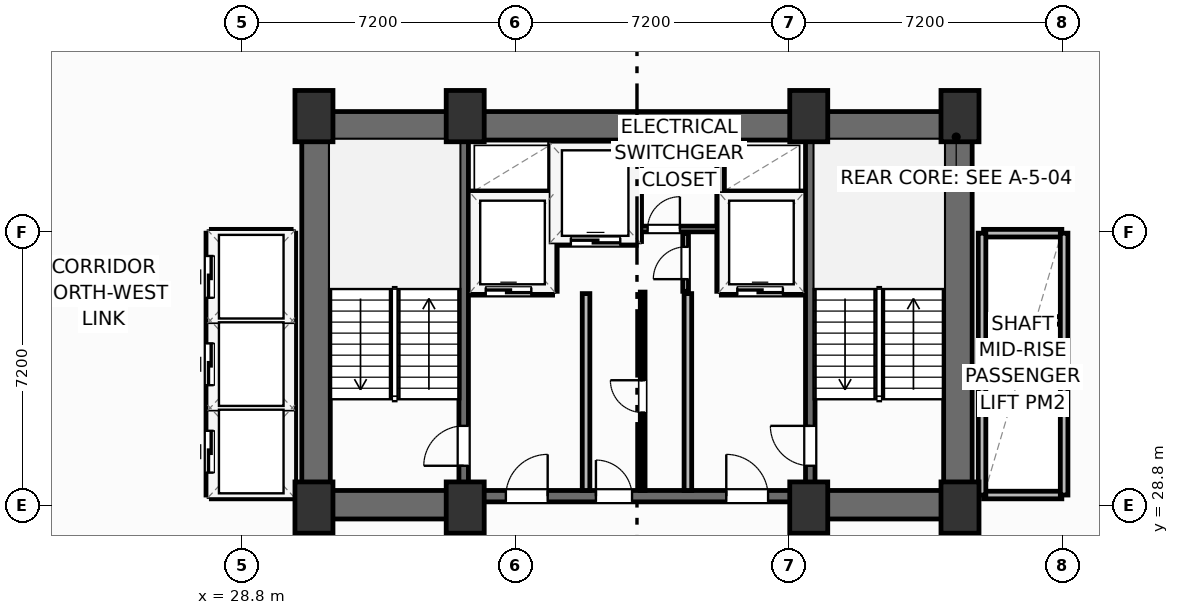
"""IFC4 building model, lengths in metres.
Left out: names, types, materials, properties, quantities, classifications, styles, units other than length and angle.
Written with IfcOpenShell. Run it as: python <this file> out.ifc"""

import sys

from ifc_helpers import new_model, si_unit, direction, frame, frame_2d, origin, origin_2d, place, context, subcontext, project, spatial, rectangle, extrude, element, fill, save


model = new_model("IFC4")
c1 = context("Model", 3, precision=1e-05, world=origin(), true_north=direction((0.0, 1.0)))
c2 = subcontext(c1, "Body", "Model", "MODEL_VIEW")
j1 = project(units=[si_unit("LENGTHUNIT", "METRE"), si_unit("PLANEANGLEUNIT", "RADIAN")], contexts=[c1])
p1 = place(None, origin())
s1 = spatial("IfcSite", under=j1, at=p1, CompositionType="ELEMENT")
p2 = place(p1, origin())
s2 = spatial("IfcBuilding", under=s1, at=p2, CompositionType="ELEMENT")
p3 = place(p2, frame((0.0, 0.0, 102.1)))
s3 = spatial("IfcBuildingStorey", under=s2, at=p3, CompositionType="ELEMENT", Elevation=102.1)
for number, where, z_axis, x_axis in (
    (1, (30.7, 28.75, 0.0), (0.0, 0.0, 1.0), (1.0, 0.0, 0.0)),
    (2, (34.68, 28.75, 0.0), (0.0, 0.0, 1.0), (1.0, 0.0, 0.0)),
    (3, (43.72, 28.75, 0.0), (0.0, 0.0, 1.0), (1.0, 0.0, 0.0)),
    (4, (47.7, 28.75, 0.0), (0.0, 0.0, 1.0), (1.0, 0.0, 0.0)),
    (5, (30.7, 39.05, 0.0), (0.0, 0.0, 1.0), (1.0, 0.0, 0.0)),
    (6, (34.68, 39.05, 0.0), (0.0, 0.0, 1.0), (1.0, 0.0, 0.0)),
    (7, (43.72, 39.05, 0.0), (0.0, 0.0, 1.0), (1.0, 0.0, 0.0)),
    (8, (47.7, 39.05, 0.0), (0.0, 0.0, 1.0), (1.0, 0.0, 0.0)),
):
    element("IfcColumn", number, at=place(p3, frame(where, z_axis=z_axis, x_axis=x_axis)), inside=s3, PredefinedType="COLUMN", context=c2, shape_type="SweptSolid", body=[
        extrude(rectangle(XDim=1.0, YDim=1.35, at=origin_2d()), origin(), (0.0, 0.0, 1.0), 3.7),
    ])
p4 = place(p3, frame((30.38, 38.795, 0.0), z_axis=(0.0, 0.0, 1.0), x_axis=(1.0, 0.0, 0.0)))
e9 = element("IfcWall", 9, at=p4, inside=s3, PredefinedType="SHEAR", context=c2, shape_type="SweptSolid", body=[
    extrude(rectangle(XDim=17.64, YDim=0.75, at=frame_2d((8.82, 0.0))), origin(), (0.0, 0.0, 1.0), 3.45),
])
for number, where, z_axis, x_axis in (
    (10, (30.755, 29.2, 0.0), (0.0, 0.0, 1.0), (0.0, 1.0, 0.0)),
    (11, (47.645, 29.2, 0.0), (0.0, 0.0, 1.0), (0.0, 1.0, 0.0)),
):
    element("IfcWall", number, at=place(p3, frame(where, z_axis=z_axis, x_axis=x_axis)), inside=s3, PredefinedType="SHEAR", context=c2, shape_type="SweptSolid", body=[
        extrude(rectangle(XDim=9.22, YDim=0.75, at=frame_2d((4.61, 0.0))), origin(), (0.0, 0.0, 1.0), 3.45),
    ])
p5 = place(p3, frame((30.38, 28.825, 0.0), z_axis=(0.0, 0.0, 1.0), x_axis=(1.0, 0.0, 0.0)))
e12 = element("IfcWall", 12, at=p5, inside=s3, PredefinedType="SHEAR", context=c2, shape_type="SweptSolid", body=[
    extrude(rectangle(XDim=4.42, YDim=0.75, at=frame_2d((2.21, 0.0))), origin(), (0.0, 0.0, 1.0), 3.45),
])
p6 = place(p3, frame((43.6, 28.825, 0.0), z_axis=(0.0, 0.0, 1.0), x_axis=(1.0, 0.0, 0.0)))
e13 = element("IfcWall", 13, at=p6, inside=s3, PredefinedType="SHEAR", context=c2, shape_type="SweptSolid", body=[
    extrude(rectangle(XDim=4.42, YDim=0.75, at=frame_2d((2.21, 0.0))), origin(), (0.0, 0.0, 1.0), 3.45),
])
p7 = place(p3, frame((34.8, 29.05, 0.0), z_axis=(0.0, 0.0, 1.0), x_axis=(1.0, 0.0, 0.0)))
e14 = element("IfcWall", 14, at=p7, inside=s3, PredefinedType="SHEAR", context=c2, shape_type="SweptSolid", body=[
    extrude(rectangle(XDim=8.8, YDim=0.3, at=frame_2d((4.4, 0.0))), origin(), (0.0, 0.0, 1.0), 3.45),
])
p8 = place(p7, frame((0.95, 0.0, 0.0)))
e15 = element("IfcOpeningElement", 15, at=p8, cuts=e14, PredefinedType="OPENING", context=c2, shape_type="SweptSolid", body=[
    extrude(rectangle(XDim=1.1, YDim=2.15, at=frame_2d((0.55, 1.075))), frame((0.0, 0.16, 0.0), z_axis=(0.0, -1.0, 0.0), x_axis=(1.0, 0.0, 0.0)), (0.0, 0.0, 1.0), 0.32),
])
p9 = place(p7, frame((6.75, 0.0, 0.0)))
e16 = element("IfcOpeningElement", 16, at=p9, cuts=e14, PredefinedType="OPENING", context=c2, shape_type="SweptSolid", body=[
    extrude(rectangle(XDim=1.1, YDim=2.15, at=frame_2d((0.55, 1.075))), frame((0.0, 0.16, 0.0), z_axis=(0.0, -1.0, 0.0), x_axis=(1.0, 0.0, 0.0)), (0.0, 0.0, 1.0), 0.32),
])
p10 = place(p7, frame((3.32, 0.0, 0.0)))
e17 = element("IfcOpeningElement", 17, at=p10, cuts=e14, PredefinedType="OPENING", context=c2, shape_type="SweptSolid", body=[
    extrude(rectangle(XDim=0.95, YDim=2.15, at=frame_2d((0.475, 1.075))), frame((0.0, 0.16, 0.0), z_axis=(0.0, -1.0, 0.0), x_axis=(1.0, 0.0, 0.0)), (0.0, 0.0, 1.0), 0.32),
])
p11 = place(p3, frame((34.64, 29.2, 0.0), z_axis=(0.0, 0.0, 1.0), x_axis=(0.0, 1.0, 0.0)))
e18 = element("IfcWall", 18, at=p11, inside=s3, PredefinedType="SHEAR", context=c2, shape_type="SweptSolid", body=[
    extrude(rectangle(XDim=9.22, YDim=0.25, at=frame_2d((4.61, 0.0))), origin(), (0.0, 0.0, 1.0), 3.45),
])
p12 = place(p11, frame((0.65, 0.0, 0.0)))
e19 = element("IfcOpeningElement", 19, at=p12, cuts=e18, PredefinedType="OPENING", context=c2, shape_type="SweptSolid", body=[
    extrude(rectangle(XDim=1.05, YDim=2.15, at=frame_2d((0.525, 1.075))), frame((0.0, 0.135, 0.0), z_axis=(0.0, -1.0, 0.0), x_axis=(1.0, 0.0, 0.0)), (0.0, 0.0, 1.0), 0.27),
])
p13 = place(p3, frame((43.76, 29.2, 0.0), z_axis=(0.0, 0.0, 1.0), x_axis=(0.0, 1.0, 0.0)))
e20 = element("IfcWall", 20, at=p13, inside=s3, PredefinedType="SHEAR", context=c2, shape_type="SweptSolid", body=[
    extrude(rectangle(XDim=9.22, YDim=0.25, at=frame_2d((4.61, 0.0))), origin(), (0.0, 0.0, 1.0), 3.45),
])
p14 = place(p13, frame((0.65, 0.0, 0.0)))
e21 = element("IfcOpeningElement", 21, at=p14, cuts=e20, PredefinedType="OPENING", context=c2, shape_type="SweptSolid", body=[
    extrude(rectangle(XDim=1.05, YDim=2.15, at=frame_2d((0.525, 1.075))), frame((0.0, 0.135, 0.0), z_axis=(0.0, -1.0, 0.0), x_axis=(1.0, 0.0, 0.0)), (0.0, 0.0, 1.0), 0.27),
])
for number, where, z_axis, x_axis in (
    (22, (37.86, 29.2, 0.0), (0.0, 0.0, 1.0), (0.0, 1.0, 0.0)),
    (23, (40.54, 29.2, 0.0), (0.0, 0.0, 1.0), (0.0, 1.0, 0.0)),
):
    element("IfcWall", number, at=place(p3, frame(where, z_axis=z_axis, x_axis=x_axis)), inside=s3, PredefinedType="PARTITIONING", context=c2, shape_type="SweptSolid", body=[
        extrude(rectangle(XDim=5.18, YDim=0.2, at=frame_2d((2.59, 0.0))), origin(), (0.0, 0.0, 1.0), 3.45),
    ])
p15 = place(p3, frame((34.8, 34.44, 0.0), z_axis=(0.0, 0.0, 1.0), x_axis=(1.0, 0.0, 0.0)))
e24 = element("IfcWall", 24, at=p15, inside=s3, PredefinedType="PARTITIONING", context=c2, shape_type="SweptSolid", body=[
    extrude(rectangle(XDim=2.18, YDim=0.2, at=frame_2d((1.09, 0.0))), origin(), (0.0, 0.0, 1.0), 3.45),
])
p16 = place(p15, frame((0.42, 0.0, 0.0)))
e25 = element("IfcOpeningElement", 25, at=p16, cuts=e24, PredefinedType="OPENING", context=c2, shape_type="SweptSolid", body=[
    extrude(rectangle(XDim=1.2, YDim=2.2, at=frame_2d((0.6, 1.1))), frame((0.0, 0.11, 0.0), z_axis=(0.0, -1.0, 0.0), x_axis=(1.0, 0.0, 0.0)), (0.0, 0.0, 1.0), 0.22),
])
p17 = place(p3, frame((34.8, 36.98, 0.0), z_axis=(0.0, 0.0, 1.0), x_axis=(1.0, 0.0, 0.0)))
e26 = element("IfcWall", 26, at=p17, inside=s3, PredefinedType="PARTITIONING", context=c2, shape_type="SweptSolid", body=[
    extrude(rectangle(XDim=2.18, YDim=0.2, at=frame_2d((1.09, 0.0))), origin(), (0.0, 0.0, 1.0), 3.45),
])
p18 = place(p3, frame((37.0, 34.44, 0.0), z_axis=(0.0, 0.0, 1.0), x_axis=(0.0, 1.0, 0.0)))
e27 = element("IfcWall", 27, at=p18, inside=s3, PredefinedType="PARTITIONING", context=c2, shape_type="SweptSolid", body=[
    extrude(rectangle(XDim=3.9, YDim=0.2, at=frame_2d((1.95, 0.0))), origin(), (0.0, 0.0, 1.0), 3.45),
])
p19 = place(p3, frame((41.42, 34.44, 0.0), z_axis=(0.0, 0.0, 1.0), x_axis=(1.0, 0.0, 0.0)))
e28 = element("IfcWall", 28, at=p19, inside=s3, PredefinedType="PARTITIONING", context=c2, shape_type="SweptSolid", body=[
    extrude(rectangle(XDim=2.18, YDim=0.2, at=frame_2d((1.09, 0.0))), origin(), (0.0, 0.0, 1.0), 3.45),
])
p20 = place(p19, frame((0.42, 0.0, 0.0)))
e29 = element("IfcOpeningElement", 29, at=p20, cuts=e28, PredefinedType="OPENING", context=c2, shape_type="SweptSolid", body=[
    extrude(rectangle(XDim=1.2, YDim=2.2, at=frame_2d((0.6, 1.1))), frame((0.0, 0.11, 0.0), z_axis=(0.0, -1.0, 0.0), x_axis=(1.0, 0.0, 0.0)), (0.0, 0.0, 1.0), 0.22),
])
p21 = place(p3, frame((41.42, 36.98, 0.0), z_axis=(0.0, 0.0, 1.0), x_axis=(1.0, 0.0, 0.0)))
e30 = element("IfcWall", 30, at=p21, inside=s3, PredefinedType="PARTITIONING", context=c2, shape_type="SweptSolid", body=[
    extrude(rectangle(XDim=2.18, YDim=0.2, at=frame_2d((1.09, 0.0))), origin(), (0.0, 0.0, 1.0), 3.45),
])
p22 = place(p3, frame((41.4, 34.44, 0.0), z_axis=(0.0, 0.0, 1.0), x_axis=(0.0, 1.0, 0.0)))
e31 = element("IfcWall", 31, at=p22, inside=s3, PredefinedType="PARTITIONING", context=c2, shape_type="SweptSolid", body=[
    extrude(rectangle(XDim=3.9, YDim=0.2, at=frame_2d((1.95, 0.0))), origin(), (0.0, 0.0, 1.0), 3.45),
])
p23 = place(p3, frame((37.06, 35.75, 0.0), z_axis=(0.0, 0.0, 1.0), x_axis=(1.0, 0.0, 0.0)))
e32 = element("IfcWall", 32, at=p23, inside=s3, PredefinedType="PARTITIONING", context=c2, shape_type="SweptSolid", body=[
    extrude(rectangle(XDim=2.12, YDim=0.2, at=frame_2d((1.06, 0.0))), origin(), (0.0, 0.0, 1.0), 3.45),
])
p24 = place(p23, frame((0.4, 0.0, 0.0)))
e33 = element("IfcOpeningElement", 33, at=p24, cuts=e32, PredefinedType="OPENING", context=c2, shape_type="SweptSolid", body=[
    extrude(rectangle(XDim=1.3, YDim=2.2, at=frame_2d((0.65, 1.1))), frame((0.0, 0.11, 0.0), z_axis=(0.0, -1.0, 0.0), x_axis=(1.0, 0.0, 0.0)), (0.0, 0.0, 1.0), 0.22),
])
p25 = place(p3, frame((39.22, 35.75, 0.0), z_axis=(0.0, 0.0, 1.0), x_axis=(0.0, 1.0, 0.0)))
e34 = element("IfcWall", 34, at=p25, inside=s3, PredefinedType="PARTITIONING", context=c2, shape_type="SweptSolid", body=[
    extrude(rectangle(XDim=2.59, YDim=0.2, at=frame_2d((1.295, 0.0))), origin(), (0.0, 0.0, 1.0), 3.45),
])
p26 = place(p3, frame((39.3, 36.08, 0.0), z_axis=(0.0, 0.0, 1.0), x_axis=(1.0, 0.0, 0.0)))
e35 = element("IfcWall", 35, at=p26, inside=s3, PredefinedType="PARTITIONING", context=c2, shape_type="SweptSolid", body=[
    extrude(rectangle(XDim=2.02, YDim=0.15, at=frame_2d((1.01, 0.0))), origin(), (0.0, 0.0, 1.0), 3.45),
])
p27 = place(p26, frame((0.18, 0.0, 0.0)))
e36 = element("IfcOpeningElement", 36, at=p27, cuts=e35, PredefinedType="OPENING", context=c2, shape_type="SweptSolid", body=[
    extrude(rectangle(XDim=0.85, YDim=2.05, at=frame_2d((0.425, 1.025))), frame((0.0, 0.085, 0.0), z_axis=(0.0, -1.0, 0.0), x_axis=(1.0, 0.0, 0.0)), (0.0, 0.0, 1.0), 0.17),
])
p28 = place(p3, frame((40.48, 34.44, 0.0), z_axis=(0.0, 0.0, 1.0), x_axis=(0.0, 1.0, 0.0)))
e37 = element("IfcWall", 37, at=p28, inside=s3, PredefinedType="PARTITIONING", context=c2, shape_type="SweptSolid", body=[
    extrude(rectangle(XDim=1.52, YDim=0.15, at=frame_2d((0.76, 0.0))), origin(), (0.0, 0.0, 1.0), 3.45),
])
p29 = place(p28, frame((0.32, 0.0, 0.0)))
e38 = element("IfcOpeningElement", 38, at=p29, cuts=e37, PredefinedType="OPENING", context=c2, shape_type="SweptSolid", body=[
    extrude(rectangle(XDim=0.85, YDim=2.05, at=frame_2d((0.425, 1.025))), frame((0.0, 0.085, 0.0), z_axis=(0.0, -1.0, 0.0), x_axis=(1.0, 0.0, 0.0)), (0.0, 0.0, 1.0), 0.17),
])
p30 = place(p3, frame((39.35, 29.2, 0.0), z_axis=(0.0, 0.0, 1.0), x_axis=(0.0, 1.0, 0.0)))
e39 = element("IfcWall", 39, at=p30, inside=s3, PredefinedType="PARTITIONING", context=c2, shape_type="SweptSolid", body=[
    extrude(rectangle(XDim=5.22, YDim=0.125, at=frame_2d((2.61, 0.0))), origin(), (0.0, 0.0, 1.0), 3.45),
])
p31 = place(p30, frame((2.05, 0.0, 0.0)))
e40 = element("IfcOpeningElement", 40, at=p31, cuts=e39, PredefinedType="OPENING", context=c2, shape_type="SweptSolid", body=[
    extrude(rectangle(XDim=0.85, YDim=2.05, at=frame_2d((0.425, 1.025))), frame((0.0, 0.073, 0.0), z_axis=(0.0, -1.0, 0.0), x_axis=(1.0, 0.0, 0.0)), (0.0, 0.0, 1.0), 0.145),
])
for number, where, z_axis, x_axis in (
    (41, (28.02, 31.375, 0.0), (0.0, 0.0, 1.0), (1.0, 0.0, 0.0)),
    (42, (28.02, 33.675, 0.0), (0.0, 0.0, 1.0), (1.0, 0.0, 0.0)),
):
    element("IfcWall", number, at=place(p3, frame(where, z_axis=z_axis, x_axis=x_axis)), inside=s3, PredefinedType="PARTITIONING", context=c2, shape_type="SweptSolid", body=[
        extrude(rectangle(XDim=2.06, YDim=0.2, at=frame_2d((1.03, 0.0))), origin(), (0.0, 0.0, 1.0), 3.45),
    ])
for number, where, z_axis, x_axis in (
    (43, (28.0, 29.08, 0.0), (0.0, 0.0, 1.0), (1.0, 0.0, 0.0)),
    (44, (28.0, 35.97, 0.0), (0.0, 0.0, 1.0), (1.0, 0.0, 0.0)),
):
    element("IfcWall", number, at=place(p3, frame(where, z_axis=z_axis, x_axis=x_axis)), inside=s3, PredefinedType="PARTITIONING", context=c2, shape_type="SweptSolid", body=[
        extrude(rectangle(XDim=2.1, YDim=0.2, at=frame_2d((1.05, 0.0))), origin(), (0.0, 0.0, 1.0), 3.45),
    ])
p32 = place(p3, frame((30.12, 29.08, 0.0), z_axis=(0.0, 0.0, 1.0), x_axis=(0.0, 1.0, 0.0)))
e45 = element("IfcWall", 45, at=p32, inside=s3, PredefinedType="PARTITIONING", context=c2, shape_type="SweptSolid", body=[
    extrude(rectangle(XDim=6.89, YDim=0.2, at=frame_2d((3.445, 0.0))), origin(), (0.0, 0.0, 1.0), 3.45),
])
p33 = place(p3, frame((27.96, 29.08, 0.0), z_axis=(0.0, 0.0, 1.0), x_axis=(0.0, 1.0, 0.0)))
e46 = element("IfcWall", 46, at=p33, inside=s3, PredefinedType="PARTITIONING", context=c2, shape_type="SweptSolid", body=[
    extrude(rectangle(XDim=6.89, YDim=0.2, at=frame_2d((3.445, 0.0))), origin(), (0.0, 0.0, 1.0), 3.45),
])
p34 = place(p33, frame((0.59, 0.0, 0.0)))
e47 = element("IfcOpeningElement", 47, at=p34, cuts=e46, PredefinedType="OPENING", context=c2, shape_type="SweptSolid", body=[
    extrude(rectangle(XDim=1.1, YDim=2.15, at=frame_2d((0.55, 1.075))), frame((0.0, 0.11, 0.0), z_axis=(0.0, -1.0, 0.0), x_axis=(1.0, 0.0, 0.0)), (0.0, 0.0, 1.0), 0.22),
])
p35 = place(p33, frame((2.89, 0.0, 0.0)))
e48 = element("IfcOpeningElement", 48, at=p35, cuts=e46, PredefinedType="OPENING", context=c2, shape_type="SweptSolid", body=[
    extrude(rectangle(XDim=1.1, YDim=2.15, at=frame_2d((0.55, 1.075))), frame((0.0, 0.11, 0.0), z_axis=(0.0, -1.0, 0.0), x_axis=(1.0, 0.0, 0.0)), (0.0, 0.0, 1.0), 0.22),
])
p36 = place(p33, frame((5.19, 0.0, 0.0)))
e49 = element("IfcOpeningElement", 49, at=p36, cuts=e46, PredefinedType="OPENING", context=c2, shape_type="SweptSolid", body=[
    extrude(rectangle(XDim=1.1, YDim=2.15, at=frame_2d((0.55, 1.075))), frame((0.0, 0.11, 0.0), z_axis=(0.0, -1.0, 0.0), x_axis=(1.0, 0.0, 0.0)), (0.0, 0.0, 1.0), 0.22),
])
for number, where, z_axis, x_axis in (
    (50, (48.32, 31.375, 0.0), (0.0, 0.0, 1.0), (1.0, 0.0, 0.0)),
    (51, (48.32, 33.675, 0.0), (0.0, 0.0, 1.0), (1.0, 0.0, 0.0)),
):
    element("IfcWall", number, at=place(p3, frame(where, z_axis=z_axis, x_axis=x_axis)), inside=s3, PredefinedType="PARTITIONING", context=c2, shape_type="SweptSolid", body=[
        extrude(rectangle(XDim=2.06, YDim=0.2, at=frame_2d((1.03, 0.0))), origin(), (0.0, 0.0, 1.0), 3.45),
    ])
p37 = place(p3, frame((48.32, 29.08, 0.0), z_axis=(0.0, 0.0, 1.0), x_axis=(1.0, 0.0, 0.0)))
e52 = element("IfcWall", 52, at=p37, inside=s3, PredefinedType="PARTITIONING", context=c2, shape_type="SweptSolid", body=[
    extrude(rectangle(XDim=2.06, YDim=0.2, at=frame_2d((1.03, 0.0))), origin(), (0.0, 0.0, 1.0), 2.662),
])
p38 = place(p3, frame((48.32, 35.97, 0.0), z_axis=(0.0, 0.0, 1.0), x_axis=(1.0, 0.0, 0.0)))
e53 = element("IfcWall", 53, at=p38, inside=s3, PredefinedType="PARTITIONING", context=c2, shape_type="SweptSolid", body=[
    extrude(rectangle(XDim=2.06, YDim=0.2, at=frame_2d((1.03, 0.0))), origin(), (0.0, 0.0, 1.0), 3.45),
])
for number, where, z_axis, x_axis in (
    (54, (48.28, 29.08, 0.0), (0.0, 0.0, 1.0), (0.0, 1.0, 0.0)),
    (55, (50.44, 29.08, 0.0), (0.0, 0.0, 1.0), (0.0, 1.0, 0.0)),
):
    element("IfcWall", number, at=place(p3, frame(where, z_axis=z_axis, x_axis=x_axis)), inside=s3, PredefinedType="PARTITIONING", context=c2, shape_type="SweptSolid", body=[
        extrude(rectangle(XDim=6.89, YDim=0.2, at=frame_2d((3.445, 0.0))), origin(), (0.0, 0.0, 1.0), 3.45),
    ])
p39 = place(p12, origin())
e56 = element("IfcDoor", 56, at=p39, inside=s3, OperationType="SINGLE_SWING_LEFT", PredefinedType="DOOR", context=c2, shape_type="SweptSolid", body=[
    extrude(rectangle(XDim=1.05, YDim=2.15, at=frame_2d((0.525, 1.075))), frame((0.0, 0.025, 0.0), z_axis=(0.0, -1.0, 0.0), x_axis=(1.0, 0.0, 0.0)), (0.0, 0.0, 1.0), 0.05),
])
fill(e19, e56)
p40 = place(p14, origin())
e57 = element("IfcDoor", 57, at=p40, inside=s3, OperationType="SINGLE_SWING_RIGHT", PredefinedType="DOOR", context=c2, shape_type="SweptSolid", body=[
    extrude(rectangle(XDim=1.05, YDim=2.15, at=frame_2d((0.525, 1.075))), frame((0.0, 0.025, 0.0), z_axis=(0.0, -1.0, 0.0), x_axis=(1.0, 0.0, 0.0)), (0.0, 0.0, 1.0), 0.05),
])
fill(e21, e57)
p41 = place(p8, origin())
e58 = element("IfcDoor", 58, at=p41, inside=s3, OperationType="SINGLE_SWING_RIGHT", PredefinedType="DOOR", context=c2, shape_type="SweptSolid", body=[
    extrude(rectangle(XDim=1.1, YDim=2.15, at=frame_2d((0.55, 1.075))), frame((0.0, 0.025, 0.0), z_axis=(0.0, -1.0, 0.0), x_axis=(1.0, 0.0, 0.0)), (0.0, 0.0, 1.0), 0.05),
])
fill(e15, e58)
p42 = place(p9, origin())
e59 = element("IfcDoor", 59, at=p42, inside=s3, OperationType="SINGLE_SWING_LEFT", PredefinedType="DOOR", context=c2, shape_type="SweptSolid", body=[
    extrude(rectangle(XDim=1.1, YDim=2.15, at=frame_2d((0.55, 1.075))), frame((0.0, 0.025, 0.0), z_axis=(0.0, -1.0, 0.0), x_axis=(1.0, 0.0, 0.0)), (0.0, 0.0, 1.0), 0.05),
])
fill(e16, e59)
p43 = place(p16, origin())
e60 = element("IfcDoor", 60, at=p43, inside=s3, OperationType="SLIDING_TO_LEFT", PredefinedType="DOOR", context=c2, shape_type="SweptSolid", body=[
    extrude(rectangle(XDim=1.2, YDim=2.2, at=frame_2d((0.6, 1.1))), frame((0.0, 0.025, 0.0), z_axis=(0.0, -1.0, 0.0), x_axis=(1.0, 0.0, 0.0)), (0.0, 0.0, 1.0), 0.05),
])
fill(e25, e60)
p44 = place(p20, origin())
e61 = element("IfcDoor", 61, at=p44, inside=s3, OperationType="SLIDING_TO_LEFT", PredefinedType="DOOR", context=c2, shape_type="SweptSolid", body=[
    extrude(rectangle(XDim=1.2, YDim=2.2, at=frame_2d((0.6, 1.1))), frame((0.0, 0.025, 0.0), z_axis=(0.0, -1.0, 0.0), x_axis=(1.0, 0.0, 0.0)), (0.0, 0.0, 1.0), 0.05),
])
fill(e29, e61)
p45 = place(p24, origin())
e62 = element("IfcDoor", 62, at=p45, inside=s3, OperationType="SLIDING_TO_LEFT", PredefinedType="DOOR", context=c2, shape_type="SweptSolid", body=[
    extrude(rectangle(XDim=1.3, YDim=2.2, at=frame_2d((0.65, 1.1))), frame((0.0, 0.025, 0.0), z_axis=(0.0, -1.0, 0.0), x_axis=(1.0, 0.0, 0.0)), (0.0, 0.0, 1.0), 0.05),
])
fill(e33, e62)
p46 = place(p27, origin())
e63 = element("IfcDoor", 63, at=p46, inside=s3, OperationType="SINGLE_SWING_RIGHT", PredefinedType="DOOR", context=c2, shape_type="SweptSolid", body=[
    extrude(rectangle(XDim=0.85, YDim=2.05, at=frame_2d((0.425, 1.025))), frame((0.0, 0.025, 0.0), z_axis=(0.0, -1.0, 0.0), x_axis=(1.0, 0.0, 0.0)), (0.0, 0.0, 1.0), 0.05),
])
fill(e36, e63)
p47 = place(p29, origin())
e64 = element("IfcDoor", 64, at=p47, inside=s3, OperationType="SINGLE_SWING_LEFT", PredefinedType="DOOR", context=c2, shape_type="SweptSolid", body=[
    extrude(rectangle(XDim=0.85, YDim=2.05, at=frame_2d((0.425, 1.025))), frame((0.0, 0.025, 0.0), z_axis=(0.0, -1.0, 0.0), x_axis=(1.0, 0.0, 0.0)), (0.0, 0.0, 1.0), 0.05),
])
fill(e38, e64)
p48 = place(p31, origin())
e65 = element("IfcDoor", 65, at=p48, inside=s3, OperationType="SINGLE_SWING_RIGHT", PredefinedType="DOOR", context=c2, shape_type="SweptSolid", body=[
    extrude(rectangle(XDim=0.85, YDim=2.05, at=frame_2d((0.425, 1.025))), frame((0.0, 0.025, 0.0), z_axis=(0.0, -1.0, 0.0), x_axis=(1.0, 0.0, 0.0)), (0.0, 0.0, 1.0), 0.05),
])
fill(e40, e65)
p49 = place(p10, origin())
e66 = element("IfcDoor", 66, at=p49, inside=s3, OperationType="SINGLE_SWING_LEFT", PredefinedType="DOOR", context=c2, shape_type="SweptSolid", body=[
    extrude(rectangle(XDim=0.95, YDim=2.15, at=frame_2d((0.475, 1.075))), frame((0.0, 0.025, 0.0), z_axis=(0.0, -1.0, 0.0), x_axis=(1.0, 0.0, 0.0)), (0.0, 0.0, 1.0), 0.05),
])
fill(e17, e66)
p50 = place(p34, origin())
e67 = element("IfcDoor", 67, at=p50, inside=s3, OperationType="SLIDING_TO_LEFT", PredefinedType="DOOR", context=c2, shape_type="SweptSolid", body=[
    extrude(rectangle(XDim=1.1, YDim=2.15, at=frame_2d((0.55, 1.075))), frame((0.0, 0.025, 0.0), z_axis=(0.0, -1.0, 0.0), x_axis=(1.0, 0.0, 0.0)), (0.0, 0.0, 1.0), 0.05),
])
fill(e47, e67)
p51 = place(p35, origin())
e68 = element("IfcDoor", 68, at=p51, inside=s3, OperationType="SLIDING_TO_LEFT", PredefinedType="DOOR", context=c2, shape_type="SweptSolid", body=[
    extrude(rectangle(XDim=1.1, YDim=2.15, at=frame_2d((0.55, 1.075))), frame((0.0, 0.025, 0.0), z_axis=(0.0, -1.0, 0.0), x_axis=(1.0, 0.0, 0.0)), (0.0, 0.0, 1.0), 0.05),
])
fill(e48, e68)
p52 = place(p36, origin())
e69 = element("IfcDoor", 69, at=p52, inside=s3, OperationType="SLIDING_TO_LEFT", PredefinedType="DOOR", context=c2, shape_type="SweptSolid", body=[
    extrude(rectangle(XDim=1.1, YDim=2.15, at=frame_2d((0.55, 1.075))), frame((0.0, 0.025, 0.0), z_axis=(0.0, -1.0, 0.0), x_axis=(1.0, 0.0, 0.0)), (0.0, 0.0, 1.0), 0.05),
])
fill(e49, e69)
save(model, sys.argv[1])
